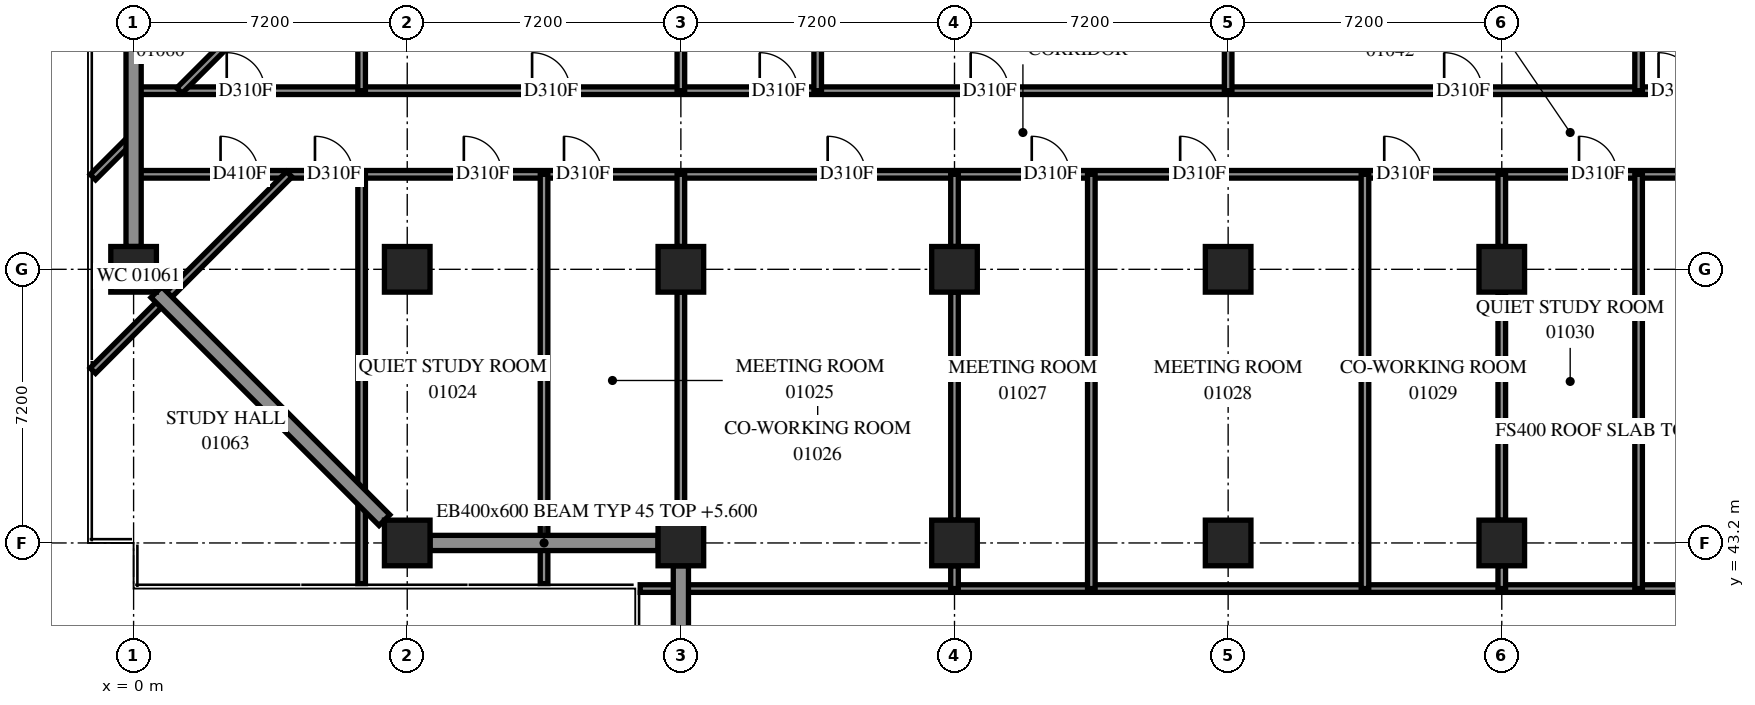
"""IFC4 building model, lengths in metres.
Left out: names, types, materials, properties, quantities, classifications, styles, units other than length and angle.
Written with IfcOpenShell. Run it as: python <this file> out.ifc"""

import sys

from ifc_helpers import new_model, si_unit, direction, frame, frame_2d, origin, origin_2d, place, context, subcontext, project, spatial, rectangle, extrude, element, fill, save


model = new_model("IFC4")
c1 = context("Model", 3, precision=1e-05, world=origin(), true_north=direction((0.0, 1.0)))
c2 = subcontext(c1, "Body", "Model", "MODEL_VIEW")
j1 = project(units=[si_unit("LENGTHUNIT", "METRE"), si_unit("PLANEANGLEUNIT", "RADIAN")], contexts=[c1])
p1 = place(None, origin())
s1 = spatial("IfcSite", under=j1, at=p1, CompositionType="ELEMENT")
p2 = place(p1, origin())
s2 = spatial("IfcBuilding", under=s1, at=p2, CompositionType="ELEMENT")
p3 = place(p2, frame((0.0, 0.0, 6.0)))
s3 = spatial("IfcBuildingStorey", under=s2, at=p3, CompositionType="ELEMENT", Elevation=6.0)
for number, where, z_axis, x_axis in (
    (1, (0.0, 50.4, 0.0), (0.0, 0.0, 1.0), (1.0, 0.0, 0.0)),
    (2, (7.2, 43.2, 0.0), (0.0, 0.0, 1.0), (1.0, 0.0, 0.0)),
    (3, (7.2, 50.4, 0.0), (0.0, 0.0, 1.0), (1.0, 0.0, 0.0)),
    (4, (14.4, 43.2, 0.0), (0.0, 0.0, 1.0), (1.0, 0.0, 0.0)),
    (5, (14.4, 50.4, 0.0), (0.0, 0.0, 1.0), (1.0, 0.0, 0.0)),
    (6, (21.6, 43.2, 0.0), (0.0, 0.0, 1.0), (1.0, 0.0, 0.0)),
    (7, (21.6, 50.4, 0.0), (0.0, 0.0, 1.0), (1.0, 0.0, 0.0)),
    (8, (28.8, 43.2, 0.0), (0.0, 0.0, 1.0), (1.0, 0.0, 0.0)),
    (9, (28.8, 50.4, 0.0), (0.0, 0.0, 1.0), (1.0, 0.0, 0.0)),
    (10, (36.0, 43.2, 0.0), (0.0, 0.0, 1.0), (1.0, 0.0, 0.0)),
    (11, (36.0, 50.4, 0.0), (0.0, 0.0, 1.0), (1.0, 0.0, 0.0)),
):
    element("IfcColumn", number, at=place(p3, frame(where, z_axis=z_axis, x_axis=x_axis)), inside=s3, PredefinedType="COLUMN", context=c2, shape_type="SweptSolid", body=[
        extrude(rectangle(XDim=1.2, YDim=1.2, at=origin_2d()), origin(), (0.0, 0.0, 1.0), 3.8),
    ])
p4 = place(p3, frame((13.33, 42.0, 0.0), z_axis=(0.0, 0.0, 1.0), x_axis=(1.0, 0.0, 0.0)))
e12 = element("IfcWall", 12, at=p4, inside=s3, PredefinedType="PARTITIONING", context=c2, shape_type="SweptSolid", body=[
    extrude(rectangle(XDim=59.74, YDim=0.2, at=frame_2d((29.87, 0.0))), origin(), (0.0, 0.0, 1.0), 3.8),
])
p5 = place(p3, frame((0.0, 55.1, 0.0), z_axis=(0.0, 0.0, 1.0), x_axis=(1.0, 0.0, 0.0)))
e13 = element("IfcWall", 13, at=p5, inside=s3, PredefinedType="PARTITIONING", context=c2, shape_type="SweptSolid", body=[
    extrude(rectangle(XDim=54.4, YDim=0.2, at=frame_2d((27.2, 0.0))), origin(), (0.0, 0.0, 1.0), 3.8),
])
p6 = place(p5, frame((10.485, 0.0, 0.0)))
e14 = element("IfcOpeningElement", 14, at=p6, cuts=e13, PredefinedType="OPENING", context=c2, shape_type="SweptSolid", body=[
    extrude(rectangle(XDim=1.0, YDim=2.1, at=frame_2d((0.5, 1.05))), frame((0.0, 0.11, 0.0), z_axis=(0.0, -1.0, 0.0), x_axis=(1.0, 0.0, 0.0)), (0.0, 0.0, 1.0), 0.22),
])
p7 = place(p5, frame((16.475, 0.0, 0.0)))
e15 = element("IfcOpeningElement", 15, at=p7, cuts=e13, PredefinedType="OPENING", context=c2, shape_type="SweptSolid", body=[
    extrude(rectangle(XDim=1.0, YDim=2.1, at=frame_2d((0.5, 1.05))), frame((0.0, 0.11, 0.0), z_axis=(0.0, -1.0, 0.0), x_axis=(1.0, 0.0, 0.0)), (0.0, 0.0, 1.0), 0.22),
])
p8 = place(p5, frame((22.025, 0.0, 0.0)))
e16 = element("IfcOpeningElement", 16, at=p8, cuts=e13, PredefinedType="OPENING", context=c2, shape_type="SweptSolid", body=[
    extrude(rectangle(XDim=1.0, YDim=2.1, at=frame_2d((0.5, 1.05))), frame((0.0, 0.11, 0.0), z_axis=(0.0, -1.0, 0.0), x_axis=(1.0, 0.0, 0.0)), (0.0, 0.0, 1.0), 0.22),
])
p9 = place(p5, frame((34.484, 0.0, 0.0)))
e17 = element("IfcOpeningElement", 17, at=p9, cuts=e13, PredefinedType="OPENING", context=c2, shape_type="SweptSolid", body=[
    extrude(rectangle(XDim=1.0, YDim=2.1, at=frame_2d((0.5, 1.05))), frame((0.0, 0.11, 0.0), z_axis=(0.0, -1.0, 0.0), x_axis=(1.0, 0.0, 0.0)), (0.0, 0.0, 1.0), 0.22),
])
p10 = place(p5, frame((40.125, 0.0, 0.0)))
e18 = element("IfcOpeningElement", 18, at=p10, cuts=e13, PredefinedType="OPENING", context=c2, shape_type="SweptSolid", body=[
    extrude(rectangle(XDim=1.0, YDim=2.1, at=frame_2d((0.5, 1.05))), frame((0.0, 0.11, 0.0), z_axis=(0.0, -1.0, 0.0), x_axis=(1.0, 0.0, 0.0)), (0.0, 0.0, 1.0), 0.22),
])
p11 = place(p5, frame((47.086, 0.0, 0.0)))
e19 = element("IfcOpeningElement", 19, at=p11, cuts=e13, PredefinedType="OPENING", context=c2, shape_type="SweptSolid", body=[
    extrude(rectangle(XDim=1.0, YDim=2.1, at=frame_2d((0.5, 1.05))), frame((0.0, 0.11, 0.0), z_axis=(0.0, -1.0, 0.0), x_axis=(1.0, 0.0, 0.0)), (0.0, 0.0, 1.0), 0.22),
])
p12 = place(p5, frame((52.709, 0.0, 0.0)))
e20 = element("IfcOpeningElement", 20, at=p12, cuts=e13, PredefinedType="OPENING", context=c2, shape_type="SweptSolid", body=[
    extrude(rectangle(XDim=1.0, YDim=2.1, at=frame_2d((0.5, 1.05))), frame((0.0, 0.11, 0.0), z_axis=(0.0, -1.0, 0.0), x_axis=(1.0, 0.0, 0.0)), (0.0, 0.0, 1.0), 0.22),
])
p13 = place(p5, frame((2.451, 0.0, 0.0)))
e21 = element("IfcOpeningElement", 21, at=p13, cuts=e13, PredefinedType="OPENING", context=c2, shape_type="SweptSolid", body=[
    extrude(rectangle(XDim=1.0, YDim=2.1, at=frame_2d((0.5, 1.05))), frame((0.0, 0.11, 0.0), z_axis=(0.0, -1.0, 0.0), x_axis=(1.0, 0.0, 0.0)), (0.0, 0.0, 1.0), 0.22),
])
p14 = place(p3, frame((0.0, 52.9, 0.0), z_axis=(0.0, 0.0, 1.0), x_axis=(1.0, 0.0, 0.0)))
e22 = element("IfcWall", 22, at=p14, inside=s3, PredefinedType="PARTITIONING", context=c2, shape_type="SweptSolid", body=[
    extrude(rectangle(XDim=54.4, YDim=0.2, at=frame_2d((27.2, 0.0))), origin(), (0.0, 0.0, 1.0), 3.8),
])
p15 = place(p14, frame((8.689, 0.0, 0.0)))
e23 = element("IfcOpeningElement", 23, at=p15, cuts=e22, PredefinedType="OPENING", context=c2, shape_type="SweptSolid", body=[
    extrude(rectangle(XDim=1.0, YDim=2.1, at=frame_2d((0.5, 1.05))), frame((0.0, 0.11, 0.0), z_axis=(0.0, -1.0, 0.0), x_axis=(1.0, 0.0, 0.0)), (0.0, 0.0, 1.0), 0.22),
])
p16 = place(p14, frame((11.325, 0.0, 0.0)))
e24 = element("IfcOpeningElement", 24, at=p16, cuts=e22, PredefinedType="OPENING", context=c2, shape_type="SweptSolid", body=[
    extrude(rectangle(XDim=1.0, YDim=2.1, at=frame_2d((0.5, 1.05))), frame((0.0, 0.11, 0.0), z_axis=(0.0, -1.0, 0.0), x_axis=(1.0, 0.0, 0.0)), (0.0, 0.0, 1.0), 0.22),
])
p17 = place(p14, frame((18.262, 0.0, 0.0)))
e25 = element("IfcOpeningElement", 25, at=p17, cuts=e22, PredefinedType="OPENING", context=c2, shape_type="SweptSolid", body=[
    extrude(rectangle(XDim=1.0, YDim=2.1, at=frame_2d((0.5, 1.05))), frame((0.0, 0.11, 0.0), z_axis=(0.0, -1.0, 0.0), x_axis=(1.0, 0.0, 0.0)), (0.0, 0.0, 1.0), 0.22),
])
p18 = place(p14, frame((23.633, 0.0, 0.0)))
e26 = element("IfcOpeningElement", 26, at=p18, cuts=e22, PredefinedType="OPENING", context=c2, shape_type="SweptSolid", body=[
    extrude(rectangle(XDim=1.0, YDim=2.1, at=frame_2d((0.5, 1.05))), frame((0.0, 0.11, 0.0), z_axis=(0.0, -1.0, 0.0), x_axis=(1.0, 0.0, 0.0)), (0.0, 0.0, 1.0), 0.22),
])
p19 = place(p14, frame((27.538, 0.0, 0.0)))
e27 = element("IfcOpeningElement", 27, at=p19, cuts=e22, PredefinedType="OPENING", context=c2, shape_type="SweptSolid", body=[
    extrude(rectangle(XDim=1.0, YDim=2.1, at=frame_2d((0.5, 1.05))), frame((0.0, 0.11, 0.0), z_axis=(0.0, -1.0, 0.0), x_axis=(1.0, 0.0, 0.0)), (0.0, 0.0, 1.0), 0.22),
])
p20 = place(p14, frame((32.907, 0.0, 0.0)))
e28 = element("IfcOpeningElement", 28, at=p20, cuts=e22, PredefinedType="OPENING", context=c2, shape_type="SweptSolid", body=[
    extrude(rectangle(XDim=1.0, YDim=2.1, at=frame_2d((0.5, 1.05))), frame((0.0, 0.11, 0.0), z_axis=(0.0, -1.0, 0.0), x_axis=(1.0, 0.0, 0.0)), (0.0, 0.0, 1.0), 0.22),
])
p21 = place(p14, frame((38.032, 0.0, 0.0)))
e29 = element("IfcOpeningElement", 29, at=p21, cuts=e22, PredefinedType="OPENING", context=c2, shape_type="SweptSolid", body=[
    extrude(rectangle(XDim=1.0, YDim=2.1, at=frame_2d((0.5, 1.05))), frame((0.0, 0.11, 0.0), z_axis=(0.0, -1.0, 0.0), x_axis=(1.0, 0.0, 0.0)), (0.0, 0.0, 1.0), 0.22),
])
p22 = place(p14, frame((41.938, 0.0, 0.0)))
e30 = element("IfcOpeningElement", 30, at=p22, cuts=e22, PredefinedType="OPENING", context=c2, shape_type="SweptSolid", body=[
    extrude(rectangle(XDim=1.0, YDim=2.1, at=frame_2d((0.5, 1.05))), frame((0.0, 0.11, 0.0), z_axis=(0.0, -1.0, 0.0), x_axis=(1.0, 0.0, 0.0)), (0.0, 0.0, 1.0), 0.22),
])
p23 = place(p14, frame((47.307, 0.0, 0.0)))
e31 = element("IfcOpeningElement", 31, at=p23, cuts=e22, PredefinedType="OPENING", context=c2, shape_type="SweptSolid", body=[
    extrude(rectangle(XDim=1.0, YDim=2.1, at=frame_2d((0.5, 1.05))), frame((0.0, 0.11, 0.0), z_axis=(0.0, -1.0, 0.0), x_axis=(1.0, 0.0, 0.0)), (0.0, 0.0, 1.0), 0.22),
])
p24 = place(p14, frame((52.432, 0.0, 0.0)))
e32 = element("IfcOpeningElement", 32, at=p24, cuts=e22, PredefinedType="OPENING", context=c2, shape_type="SweptSolid", body=[
    extrude(rectangle(XDim=1.0, YDim=2.1, at=frame_2d((0.5, 1.05))), frame((0.0, 0.11, 0.0), z_axis=(0.0, -1.0, 0.0), x_axis=(1.0, 0.0, 0.0)), (0.0, 0.0, 1.0), 0.22),
])
p25 = place(p14, frame((2.288, 0.0, 0.0)))
e33 = element("IfcOpeningElement", 33, at=p25, cuts=e22, PredefinedType="OPENING", context=c2, shape_type="SweptSolid", body=[
    extrude(rectangle(XDim=1.0, YDim=2.1, at=frame_2d((0.5, 1.05))), frame((0.0, 0.11, 0.0), z_axis=(0.0, -1.0, 0.0), x_axis=(1.0, 0.0, 0.0)), (0.0, 0.0, 1.0), 0.22),
])
p26 = place(p14, frame((4.772, 0.0, 0.0)))
e34 = element("IfcOpeningElement", 34, at=p26, cuts=e22, PredefinedType="OPENING", context=c2, shape_type="SweptSolid", body=[
    extrude(rectangle(XDim=1.0, YDim=2.1, at=frame_2d((0.5, 1.05))), frame((0.0, 0.11, 0.0), z_axis=(0.0, -1.0, 0.0), x_axis=(1.0, 0.0, 0.0)), (0.0, 0.0, 1.0), 0.22),
])
for number, where, z_axis, x_axis in (
    (35, (25.2, 42.0, 0.0), (0.0, 0.0, 1.0), (0.0, 1.0, 0.0)),
    (36, (32.4, 42.0, 0.0), (0.0, 0.0, 1.0), (0.0, 1.0, 0.0)),
    (37, (39.6, 42.0, 0.0), (0.0, 0.0, 1.0), (0.0, 1.0, 0.0)),
):
    element("IfcWall", number, at=place(p3, frame(where, z_axis=z_axis, x_axis=x_axis)), inside=s3, PredefinedType="PARTITIONING", context=c2, shape_type="SweptSolid", body=[
        extrude(rectangle(XDim=10.9, YDim=0.2, at=frame_2d((5.45, 0.0))), origin(), (0.0, 0.0, 1.0), 3.8),
    ])
for number, where, z_axis, x_axis in (
    (38, (6.0, 42.13, 0.0), (0.0, 0.0, 1.0), (0.0, 1.0, 0.0)),
    (39, (10.8, 42.13, 0.0), (0.0, 0.0, 1.0), (0.0, 1.0, 0.0)),
):
    element("IfcWall", number, at=place(p3, frame(where, z_axis=z_axis, x_axis=x_axis)), inside=s3, PredefinedType="PARTITIONING", context=c2, shape_type="SweptSolid", body=[
        extrude(rectangle(XDim=10.77, YDim=0.2, at=frame_2d((5.385, 0.0))), origin(), (0.0, 0.0, 1.0), 3.8),
    ])
p27 = place(p3, frame((-1.071, 47.733, 0.0), z_axis=(0.0, 0.0, 1.0), x_axis=(0.7071067812, 0.7071067812, 0.0)))
e40 = element("IfcWall", 40, at=p27, inside=s3, PredefinedType="PARTITIONING", context=c2, shape_type="SweptSolid", body=[
    extrude(rectangle(XDim=7.309, YDim=0.2, at=frame_2d((3.654, 0.0))), origin(), (0.0, 0.0, 1.0), 3.8),
])
p28 = place(p3, frame((1.205, 55.101, 0.0), z_axis=(0.0, 0.0, 1.0), x_axis=(0.7071067812, 0.7071067812, 0.0)))
e41 = element("IfcWall", 41, at=p28, inside=s3, PredefinedType="PARTITIONING", context=c2, shape_type="SweptSolid", body=[
    extrude(rectangle(XDim=6.78, YDim=0.2, at=frame_2d((3.39, 0.0))), origin(), (0.0, 0.0, 1.0), 3.8),
])
for number, where, z_axis, x_axis in (
    (42, (14.4, 43.8, 0.0), (0.0, 0.0, 1.0), (0.0, 1.0, 0.0)),
    (43, (21.6, 43.8, 0.0), (0.0, 0.0, 1.0), (0.0, 1.0, 0.0)),
    (44, (36.0, 43.8, 0.0), (0.0, 0.0, 1.0), (0.0, 1.0, 0.0)),
):
    element("IfcWall", number, at=place(p3, frame(where, z_axis=z_axis, x_axis=x_axis)), inside=s3, PredefinedType="PARTITIONING", context=c2, shape_type="SweptSolid", body=[
        extrude(rectangle(XDim=6.0, YDim=0.2, at=frame_2d((3.0, 0.0))), origin(), (0.0, 0.0, 1.0), 3.8),
    ])
for number, where, z_axis, x_axis in (
    (45, (18.0, 55.1, 0.0), (0.0, 0.0, 1.0), (0.0, 1.0, 0.0)),
    (46, (39.6, 55.1, 0.0), (0.0, 0.0, 1.0), (0.0, 1.0, 0.0)),
):
    element("IfcWall", number, at=place(p3, frame(where, z_axis=z_axis, x_axis=x_axis)), inside=s3, PredefinedType="PARTITIONING", context=c2, shape_type="SweptSolid", body=[
        extrude(rectangle(XDim=5.0, YDim=0.2, at=frame_2d((2.5, 0.0))), origin(), (0.0, 0.0, 1.0), 3.8),
    ])
p29 = place(p3, frame((6.0, 55.1, 0.0), z_axis=(0.0, 0.0, 1.0), x_axis=(0.0, 1.0, 0.0)))
e47 = element("IfcWall", 47, at=p29, inside=s3, PredefinedType="PARTITIONING", context=c2, shape_type="SweptSolid", body=[
    extrude(rectangle(XDim=4.794, YDim=0.2, at=frame_2d((2.397, 0.0))), origin(), (0.0, 0.0, 1.0), 3.8),
])
p30 = place(p3, frame((0.0, 52.9, 0.0), z_axis=(0.0, 0.0, 1.0), x_axis=(0.0, 1.0, 0.0)))
e48 = element("IfcWall", 48, at=p30, inside=s3, PredefinedType="PARTITIONING", context=c2, shape_type="SweptSolid", body=[
    extrude(rectangle(XDim=2.2, YDim=0.2, at=frame_2d((1.1, 0.0))), origin(), (0.0, 0.0, 1.0), 3.2),
])
for number, where, z_axis, x_axis in (
    (49, (14.4, 51.0, 0.0), (0.0, 0.0, 1.0), (0.0, 1.0, 0.0)),
    (50, (14.4, 55.1, 0.0), (0.0, 0.0, 1.0), (0.0, 1.0, 0.0)),
    (51, (21.6, 51.0, 0.0), (0.0, 0.0, 1.0), (0.0, 1.0, 0.0)),
    (52, (28.8, 55.1, 0.0), (0.0, 0.0, 1.0), (0.0, 1.0, 0.0)),
    (53, (36.0, 51.0, 0.0), (0.0, 0.0, 1.0), (0.0, 1.0, 0.0)),
):
    element("IfcWall", number, at=place(p3, frame(where, z_axis=z_axis, x_axis=x_axis)), inside=s3, PredefinedType="PARTITIONING", context=c2, shape_type="SweptSolid", body=[
        extrude(rectangle(XDim=1.9, YDim=0.2, at=frame_2d((0.95, 0.0))), origin(), (0.0, 0.0, 1.0), 3.8),
    ])
p31 = place(p3, frame((-1.071, 52.825, 0.0), z_axis=(0.0, 0.0, 1.0), x_axis=(0.7071067812, 0.7071067812, 0.0)))
e54 = element("IfcWall", 54, at=p31, inside=s3, PredefinedType="PARTITIONING", context=c2, shape_type="SweptSolid", body=[
    extrude(rectangle(XDim=1.513, YDim=0.2, at=frame_2d((0.757, 0.0))), origin(), (0.0, 0.0, 1.0), 3.8),
])
p32 = place(p3, frame((14.4, 42.0, 0.0), z_axis=(0.0, 0.0, 1.0), x_axis=(0.0, 1.0, 0.0)))
e55 = element("IfcWall", 55, at=p32, inside=s3, PredefinedType="PARTITIONING", context=c2, shape_type="SweptSolid", body=[
    extrude(rectangle(XDim=0.6, YDim=0.2, at=frame_2d((0.3, 0.0))), origin(), (0.0, 0.0, 1.0), 3.2),
])
for number, where, z_axis, x_axis in (
    (56, (21.6, 42.0, 0.0), (0.0, 0.0, 1.0), (0.0, 1.0, 0.0)),
    (57, (36.0, 42.0, 0.0), (0.0, 0.0, 1.0), (0.0, 1.0, 0.0)),
):
    element("IfcWall", number, at=place(p3, frame(where, z_axis=z_axis, x_axis=x_axis)), inside=s3, PredefinedType="PARTITIONING", context=c2, shape_type="SweptSolid", body=[
        extrude(rectangle(XDim=0.6, YDim=0.2, at=frame_2d((0.3, 0.0))), origin(), (0.0, 0.0, 1.0), 3.8),
    ])
p33 = place(p15, origin())
e58 = element("IfcDoor", 58, at=p33, inside=s3, OperationType="SINGLE_SWING_LEFT", PredefinedType="DOOR", context=c2, shape_type="SweptSolid", body=[
    extrude(rectangle(XDim=1.0, YDim=2.1, at=frame_2d((0.5, 1.05))), frame((0.0, 0.025, 0.0), z_axis=(0.0, -1.0, 0.0), x_axis=(1.0, 0.0, 0.0)), (0.0, 0.0, 1.0), 0.05),
])
fill(e23, e58)
p34 = place(p16, origin())
e59 = element("IfcDoor", 59, at=p34, inside=s3, OperationType="SINGLE_SWING_RIGHT", PredefinedType="DOOR", context=c2, shape_type="SweptSolid", body=[
    extrude(rectangle(XDim=1.0, YDim=2.1, at=frame_2d((0.5, 1.05))), frame((0.0, 0.025, 0.0), z_axis=(0.0, -1.0, 0.0), x_axis=(1.0, 0.0, 0.0)), (0.0, 0.0, 1.0), 0.05),
])
fill(e24, e59)
p35 = place(p17, origin())
e60 = element("IfcDoor", 60, at=p35, inside=s3, OperationType="SINGLE_SWING_LEFT", PredefinedType="DOOR", context=c2, shape_type="SweptSolid", body=[
    extrude(rectangle(XDim=1.0, YDim=2.1, at=frame_2d((0.5, 1.05))), frame((0.0, 0.025, 0.0), z_axis=(0.0, -1.0, 0.0), x_axis=(1.0, 0.0, 0.0)), (0.0, 0.0, 1.0), 0.05),
])
fill(e25, e60)
p36 = place(p18, origin())
e61 = element("IfcDoor", 61, at=p36, inside=s3, OperationType="SINGLE_SWING_LEFT", PredefinedType="DOOR", context=c2, shape_type="SweptSolid", body=[
    extrude(rectangle(XDim=1.0, YDim=2.1, at=frame_2d((0.5, 1.05))), frame((0.0, 0.025, 0.0), z_axis=(0.0, -1.0, 0.0), x_axis=(1.0, 0.0, 0.0)), (0.0, 0.0, 1.0), 0.05),
])
fill(e26, e61)
p37 = place(p19, origin())
e62 = element("IfcDoor", 62, at=p37, inside=s3, OperationType="SINGLE_SWING_RIGHT", PredefinedType="DOOR", context=c2, shape_type="SweptSolid", body=[
    extrude(rectangle(XDim=1.0, YDim=2.1, at=frame_2d((0.5, 1.05))), frame((0.0, 0.025, 0.0), z_axis=(0.0, -1.0, 0.0), x_axis=(1.0, 0.0, 0.0)), (0.0, 0.0, 1.0), 0.05),
])
fill(e27, e62)
p38 = place(p20, origin())
e63 = element("IfcDoor", 63, at=p38, inside=s3, OperationType="SINGLE_SWING_RIGHT", PredefinedType="DOOR", context=c2, shape_type="SweptSolid", body=[
    extrude(rectangle(XDim=1.0, YDim=2.1, at=frame_2d((0.5, 1.05))), frame((0.0, 0.025, 0.0), z_axis=(0.0, -1.0, 0.0), x_axis=(1.0, 0.0, 0.0)), (0.0, 0.0, 1.0), 0.05),
])
fill(e28, e63)
p39 = place(p21, origin())
e64 = element("IfcDoor", 64, at=p39, inside=s3, OperationType="SINGLE_SWING_LEFT", PredefinedType="DOOR", context=c2, shape_type="SweptSolid", body=[
    extrude(rectangle(XDim=1.0, YDim=2.1, at=frame_2d((0.5, 1.05))), frame((0.0, 0.025, 0.0), z_axis=(0.0, -1.0, 0.0), x_axis=(1.0, 0.0, 0.0)), (0.0, 0.0, 1.0), 0.05),
])
fill(e29, e64)
p40 = place(p6, origin())
e65 = element("IfcDoor", 65, at=p40, inside=s3, OperationType="SINGLE_SWING_RIGHT", PredefinedType="DOOR", context=c2, shape_type="SweptSolid", body=[
    extrude(rectangle(XDim=1.0, YDim=2.1, at=frame_2d((0.5, 1.05))), frame((0.0, 0.025, 0.0), z_axis=(0.0, -1.0, 0.0), x_axis=(1.0, 0.0, 0.0)), (0.0, 0.0, 1.0), 0.05),
])
fill(e14, e65)
p41 = place(p7, origin())
e66 = element("IfcDoor", 66, at=p41, inside=s3, OperationType="SINGLE_SWING_RIGHT", PredefinedType="DOOR", context=c2, shape_type="SweptSolid", body=[
    extrude(rectangle(XDim=1.0, YDim=2.1, at=frame_2d((0.5, 1.05))), frame((0.0, 0.025, 0.0), z_axis=(0.0, -1.0, 0.0), x_axis=(1.0, 0.0, 0.0)), (0.0, 0.0, 1.0), 0.05),
])
fill(e15, e66)
p42 = place(p8, origin())
e67 = element("IfcDoor", 67, at=p42, inside=s3, OperationType="SINGLE_SWING_LEFT", PredefinedType="DOOR", context=c2, shape_type="SweptSolid", body=[
    extrude(rectangle(XDim=1.0, YDim=2.1, at=frame_2d((0.5, 1.05))), frame((0.0, 0.025, 0.0), z_axis=(0.0, -1.0, 0.0), x_axis=(1.0, 0.0, 0.0)), (0.0, 0.0, 1.0), 0.05),
])
fill(e16, e67)
p43 = place(p9, origin())
e68 = element("IfcDoor", 68, at=p43, inside=s3, OperationType="SINGLE_SWING_RIGHT", PredefinedType="DOOR", context=c2, shape_type="SweptSolid", body=[
    extrude(rectangle(XDim=1.0, YDim=2.1, at=frame_2d((0.5, 1.05))), frame((0.0, 0.025, 0.0), z_axis=(0.0, -1.0, 0.0), x_axis=(1.0, 0.0, 0.0)), (0.0, 0.0, 1.0), 0.05),
])
fill(e17, e68)
p44 = place(p10, origin())
e69 = element("IfcDoor", 69, at=p44, inside=s3, OperationType="SINGLE_SWING_LEFT", PredefinedType="DOOR", context=c2, shape_type="SweptSolid", body=[
    extrude(rectangle(XDim=1.0, YDim=2.1, at=frame_2d((0.5, 1.05))), frame((0.0, 0.025, 0.0), z_axis=(0.0, -1.0, 0.0), x_axis=(1.0, 0.0, 0.0)), (0.0, 0.0, 1.0), 0.05),
])
fill(e18, e69)
p45 = place(p25, origin())
e70 = element("IfcDoor", 70, at=p45, inside=s3, OperationType="SINGLE_SWING_RIGHT", PredefinedType="DOOR", context=c2, shape_type="SweptSolid", body=[
    extrude(rectangle(XDim=1.0, YDim=2.1, at=frame_2d((0.5, 1.05))), frame((0.0, 0.025, 0.0), z_axis=(0.0, -1.0, 0.0), x_axis=(1.0, 0.0, 0.0)), (0.0, 0.0, 1.0), 0.05),
])
fill(e33, e70)
p46 = place(p13, origin())
e71 = element("IfcDoor", 71, at=p46, inside=s3, OperationType="SINGLE_SWING_LEFT", PredefinedType="DOOR", context=c2, shape_type="SweptSolid", body=[
    extrude(rectangle(XDim=1.0, YDim=2.1, at=frame_2d((0.5, 1.05))), frame((0.0, 0.025, 0.0), z_axis=(0.0, -1.0, 0.0), x_axis=(1.0, 0.0, 0.0)), (0.0, 0.0, 1.0), 0.05),
])
fill(e21, e71)
p47 = place(p26, origin())
e72 = element("IfcDoor", 72, at=p47, inside=s3, OperationType="SINGLE_SWING_LEFT", PredefinedType="DOOR", context=c2, shape_type="SweptSolid", body=[
    extrude(rectangle(XDim=1.0, YDim=2.1, at=frame_2d((0.5, 1.05))), frame((0.0, 0.025, 0.0), z_axis=(0.0, -1.0, 0.0), x_axis=(1.0, 0.0, 0.0)), (0.0, 0.0, 1.0), 0.05),
])
fill(e34, e72)
save(model, sys.argv[1])
